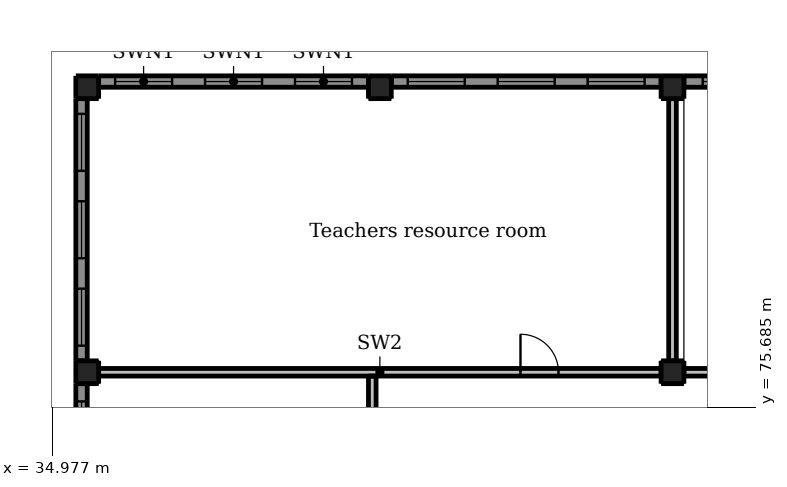
"""IFC4 building model, lengths in metres.
Left out: names, types, materials, properties, quantities, classifications, styles, units other than length and angle.
Written with IfcOpenShell. Run it as: python <this file> out.ifc"""

import sys

from ifc_helpers import new_model, si_unit, direction, frame, frame_2d, origin, origin_2d, place, context, subcontext, project, spatial, rectangle, extrude, element, fill, save


model = new_model("IFC4")
c1 = context("Model", 3, precision=1e-05, world=origin(), true_north=direction((0.0, 1.0)))
c2 = subcontext(c1, "Body", "Model", "MODEL_VIEW")
j1 = project(units=[si_unit("LENGTHUNIT", "METRE"), si_unit("PLANEANGLEUNIT", "RADIAN")], contexts=[c1])
p1 = place(None, origin())
s1 = spatial("IfcSite", under=j1, at=p1, CompositionType="ELEMENT")
p2 = place(p1, origin())
s2 = spatial("IfcBuilding", under=s1, at=p2, CompositionType="ELEMENT")
p3 = place(p2, frame((0.0, 0.0, 5.5)))
s3 = spatial("IfcBuildingStorey", under=s2, at=p3, CompositionType="ELEMENT", Elevation=5.5)
for number, where, z_axis, x_axis in (
    (1, (35.9, 76.6, -0.3), (0.0, 0.0, 1.0), (1.0, 0.0, 0.0)),
    (2, (51.3, 76.6, -0.3), (0.0, 0.0, 1.0), (1.0, 0.0, 0.0)),
    (3, (35.9, 84.1, -0.3), (0.0, 0.0, 1.0), (1.0, 0.0, 0.0)),
    (4, (51.3, 84.1, -0.3), (0.0, 0.0, 1.0), (1.0, 0.0, 0.0)),
    (5, (43.6, 84.1, -0.3), (0.0, 0.0, 1.0), (1.0, 0.0, 0.0)),
):
    element("IfcColumn", number, at=place(p3, frame(where, z_axis=z_axis, x_axis=x_axis)), inside=s3, PredefinedType="COLUMN", context=c2, shape_type="SweptSolid", body=[
        extrude(rectangle(XDim=0.6, YDim=0.6, at=origin_2d()), origin(), (0.0, 0.0, 1.0), 4.5),
    ])
p4 = place(p3, frame((35.75, 69.0, 0.0), z_axis=(0.0, 0.0, 1.0), x_axis=(0.0, 1.0, 0.0)))
e6 = element("IfcWall", 6, at=p4, inside=s3, PredefinedType="SOLIDWALL", context=c2, shape_type="SweptSolid", body=[
    extrude(rectangle(XDim=7.3, YDim=0.3, at=frame_2d((3.65, 0.0))), origin(), (0.0, 0.0, 1.0), 3.3),
])
p5 = place(p4, frame((0.467, 0.0, 0.9)))
e7 = element("IfcOpeningElement", 7, at=p5, cuts=e6, PredefinedType="OPENING", context=c2, shape_type="SweptSolid", body=[
    extrude(rectangle(XDim=1.5, YDim=1.5, at=frame_2d((0.75, 0.75))), frame((0.0, 0.16, 0.0), z_axis=(0.0, -1.0, 0.0), x_axis=(1.0, 0.0, 0.0)), (0.0, 0.0, 1.0), 0.32),
])
p6 = place(p4, frame((2.9, 0.0, 0.9)))
e8 = element("IfcOpeningElement", 8, at=p6, cuts=e6, PredefinedType="OPENING", context=c2, shape_type="SweptSolid", body=[
    extrude(rectangle(XDim=1.5, YDim=1.5, at=frame_2d((0.75, 0.75))), frame((0.0, 0.16, 0.0), z_axis=(0.0, -1.0, 0.0), x_axis=(1.0, 0.0, 0.0)), (0.0, 0.0, 1.0), 0.32),
])
p7 = place(p4, frame((5.333, 0.0, 0.9)))
e9 = element("IfcOpeningElement", 9, at=p7, cuts=e6, PredefinedType="OPENING", context=c2, shape_type="SweptSolid", body=[
    extrude(rectangle(XDim=1.5, YDim=1.5, at=frame_2d((0.75, 0.75))), frame((0.0, 0.16, 0.0), z_axis=(0.0, -1.0, 0.0), x_axis=(1.0, 0.0, 0.0)), (0.0, 0.0, 1.0), 0.32),
])
p8 = place(p3, frame((35.75, 76.9, 0.0), z_axis=(0.0, 0.0, 1.0), x_axis=(0.0, 1.0, 0.0)))
e10 = element("IfcWall", 10, at=p8, inside=s3, PredefinedType="SOLIDWALL", context=c2, shape_type="SweptSolid", body=[
    extrude(rectangle(XDim=6.9, YDim=0.3, at=frame_2d((3.45, 0.0))), origin(), (0.0, 0.0, 1.0), 3.3),
])
p9 = place(p8, frame((0.4, 0.0, 0.9)))
e11 = element("IfcOpeningElement", 11, at=p9, cuts=e10, PredefinedType="OPENING", context=c2, shape_type="SweptSolid", body=[
    extrude(rectangle(XDim=1.5, YDim=1.5, at=frame_2d((0.75, 0.75))), frame((0.0, 0.16, 0.0), z_axis=(0.0, -1.0, 0.0), x_axis=(1.0, 0.0, 0.0)), (0.0, 0.0, 1.0), 0.32),
])
p10 = place(p8, frame((2.7, 0.0, 0.9)))
e12 = element("IfcOpeningElement", 12, at=p10, cuts=e10, PredefinedType="OPENING", context=c2, shape_type="SweptSolid", body=[
    extrude(rectangle(XDim=1.5, YDim=1.5, at=frame_2d((0.75, 0.75))), frame((0.0, 0.16, 0.0), z_axis=(0.0, -1.0, 0.0), x_axis=(1.0, 0.0, 0.0)), (0.0, 0.0, 1.0), 0.32),
])
p11 = place(p8, frame((5.0, 0.0, 0.9)))
e13 = element("IfcOpeningElement", 13, at=p11, cuts=e10, PredefinedType="OPENING", context=c2, shape_type="SweptSolid", body=[
    extrude(rectangle(XDim=1.5, YDim=1.5, at=frame_2d((0.75, 0.75))), frame((0.0, 0.16, 0.0), z_axis=(0.0, -1.0, 0.0), x_axis=(1.0, 0.0, 0.0)), (0.0, 0.0, 1.0), 0.32),
])
p12 = place(p3, frame((36.2, 84.25, 0.0), z_axis=(0.0, 0.0, 1.0), x_axis=(1.0, 0.0, 0.0)))
e14 = element("IfcWall", 14, at=p12, inside=s3, PredefinedType="SOLIDWALL", context=c2, shape_type="SweptSolid", body=[
    extrude(rectangle(XDim=7.1, YDim=0.3, at=frame_2d((3.55, 0.0))), origin(), (0.0, 0.0, 1.0), 3.3),
])
p13 = place(p12, frame((0.433, 0.0, 0.9)))
e15 = element("IfcOpeningElement", 15, at=p13, cuts=e14, PredefinedType="OPENING", context=c2, shape_type="SweptSolid", body=[
    extrude(rectangle(XDim=1.5, YDim=1.5, at=frame_2d((0.75, 0.75))), frame((0.0, 0.16, 0.0), z_axis=(0.0, -1.0, 0.0), x_axis=(1.0, 0.0, 0.0)), (0.0, 0.0, 1.0), 0.32),
])
p14 = place(p12, frame((2.8, 0.0, 0.9)))
e16 = element("IfcOpeningElement", 16, at=p14, cuts=e14, PredefinedType="OPENING", context=c2, shape_type="SweptSolid", body=[
    extrude(rectangle(XDim=1.5, YDim=1.5, at=frame_2d((0.75, 0.75))), frame((0.0, 0.16, 0.0), z_axis=(0.0, -1.0, 0.0), x_axis=(1.0, 0.0, 0.0)), (0.0, 0.0, 1.0), 0.32),
])
p15 = place(p12, frame((5.167, 0.0, 0.9)))
e17 = element("IfcOpeningElement", 17, at=p15, cuts=e14, PredefinedType="OPENING", context=c2, shape_type="SweptSolid", body=[
    extrude(rectangle(XDim=1.5, YDim=1.5, at=frame_2d((0.75, 0.75))), frame((0.0, 0.16, 0.0), z_axis=(0.0, -1.0, 0.0), x_axis=(1.0, 0.0, 0.0)), (0.0, 0.0, 1.0), 0.32),
])
p16 = place(p3, frame((43.9, 84.25, 0.0), z_axis=(0.0, 0.0, 1.0), x_axis=(1.0, 0.0, 0.0)))
e18 = element("IfcWall", 18, at=p16, inside=s3, PredefinedType="SOLIDWALL", context=c2, shape_type="SweptSolid", body=[
    extrude(rectangle(XDim=7.1, YDim=0.3, at=frame_2d((3.55, 0.0))), origin(), (0.0, 0.0, 1.0), 3.3),
])
p17 = place(p16, frame((0.433, 0.0, 0.9)))
e19 = element("IfcOpeningElement", 19, at=p17, cuts=e18, PredefinedType="OPENING", context=c2, shape_type="SweptSolid", body=[
    extrude(rectangle(XDim=1.5, YDim=1.5, at=frame_2d((0.75, 0.75))), frame((0.0, 0.16, 0.0), z_axis=(0.0, -1.0, 0.0), x_axis=(1.0, 0.0, 0.0)), (0.0, 0.0, 1.0), 0.32),
])
p18 = place(p16, frame((2.8, 0.0, 0.9)))
e20 = element("IfcOpeningElement", 20, at=p18, cuts=e18, PredefinedType="OPENING", context=c2, shape_type="SweptSolid", body=[
    extrude(rectangle(XDim=1.5, YDim=1.5, at=frame_2d((0.75, 0.75))), frame((0.0, 0.16, 0.0), z_axis=(0.0, -1.0, 0.0), x_axis=(1.0, 0.0, 0.0)), (0.0, 0.0, 1.0), 0.32),
])
p19 = place(p16, frame((5.167, 0.0, 0.9)))
e21 = element("IfcOpeningElement", 21, at=p19, cuts=e18, PredefinedType="OPENING", context=c2, shape_type="SweptSolid", body=[
    extrude(rectangle(XDim=1.5, YDim=1.5, at=frame_2d((0.75, 0.75))), frame((0.0, 0.16, 0.0), z_axis=(0.0, -1.0, 0.0), x_axis=(1.0, 0.0, 0.0)), (0.0, 0.0, 1.0), 0.32),
])
p20 = place(p3, frame((51.6, 84.25, 0.0), z_axis=(0.0, 0.0, 1.0), x_axis=(1.0, 0.0, 0.0)))
e22 = element("IfcWall", 22, at=p20, inside=s3, PredefinedType="SOLIDWALL", context=c2, shape_type="SweptSolid", body=[
    extrude(rectangle(XDim=7.467, YDim=0.3, at=frame_2d((3.733, 0.0))), origin(), (0.0, 0.0, 1.0), 3.3),
])
p21 = place(p20, frame((0.494, 0.0, 0.9)))
e23 = element("IfcOpeningElement", 23, at=p21, cuts=e22, PredefinedType="OPENING", context=c2, shape_type="SweptSolid", body=[
    extrude(rectangle(XDim=1.5, YDim=1.5, at=frame_2d((0.75, 0.75))), frame((0.0, 0.16, 0.0), z_axis=(0.0, -1.0, 0.0), x_axis=(1.0, 0.0, 0.0)), (0.0, 0.0, 1.0), 0.32),
])
p22 = place(p20, frame((2.983, 0.0, 0.9)))
e24 = element("IfcOpeningElement", 24, at=p22, cuts=e22, PredefinedType="OPENING", context=c2, shape_type="SweptSolid", body=[
    extrude(rectangle(XDim=1.5, YDim=1.5, at=frame_2d((0.75, 0.75))), frame((0.0, 0.16, 0.0), z_axis=(0.0, -1.0, 0.0), x_axis=(1.0, 0.0, 0.0)), (0.0, 0.0, 1.0), 0.32),
])
p23 = place(p20, frame((5.472, 0.0, 0.9)))
e25 = element("IfcOpeningElement", 25, at=p23, cuts=e22, PredefinedType="OPENING", context=c2, shape_type="SweptSolid", body=[
    extrude(rectangle(XDim=1.5, YDim=1.5, at=frame_2d((0.75, 0.75))), frame((0.0, 0.16, 0.0), z_axis=(0.0, -1.0, 0.0), x_axis=(1.0, 0.0, 0.0)), (0.0, 0.0, 1.0), 0.32),
])
p24 = place(p3, frame((43.4, 68.8, 0.0), z_axis=(0.0, 0.0, 1.0), x_axis=(0.0, 1.0, 0.0)))
e26 = element("IfcWall", 26, at=p24, inside=s3, PredefinedType="PARTITIONING", context=c2, shape_type="SweptSolid", body=[
    extrude(rectangle(XDim=7.7, YDim=0.2, at=frame_2d((3.85, 0.0))), origin(), (0.0, 0.0, 1.0), 3.1),
])
p25 = place(p24, frame((3.35, 0.0, 0.0)))
e27 = element("IfcOpeningElement", 27, at=p25, cuts=e26, PredefinedType="OPENING", context=c2, shape_type="SweptSolid", body=[
    extrude(rectangle(XDim=1.0, YDim=2.1, at=frame_2d((0.5, 1.05))), frame((0.0, 0.11, 0.0), z_axis=(0.0, -1.0, 0.0), x_axis=(1.0, 0.0, 0.0)), (0.0, 0.0, 1.0), 0.22),
])
p26 = place(p3, frame((36.2, 76.6, 0.0), z_axis=(0.0, 0.0, 1.0), x_axis=(1.0, 0.0, 0.0)))
e28 = element("IfcWall", 28, at=p26, inside=s3, PredefinedType="PARTITIONING", context=c2, shape_type="SweptSolid", body=[
    extrude(rectangle(XDim=14.8, YDim=0.2, at=frame_2d((7.4, 0.0))), origin(), (0.0, 0.0, 1.0), 3.1),
])
p27 = place(p26, frame((11.1, 0.0, 0.0)))
e29 = element("IfcOpeningElement", 29, at=p27, cuts=e28, PredefinedType="OPENING", context=c2, shape_type="SweptSolid", body=[
    extrude(rectangle(XDim=1.0, YDim=2.1, at=frame_2d((0.5, 1.05))), frame((0.0, 0.11, 0.0), z_axis=(0.0, -1.0, 0.0), x_axis=(1.0, 0.0, 0.0)), (0.0, 0.0, 1.0), 0.22),
])
p28 = place(p3, frame((51.3, 76.9, 0.0), z_axis=(0.0, 0.0, 1.0), x_axis=(0.0, 1.0, 0.0)))
e30 = element("IfcWall", 30, at=p28, inside=s3, PredefinedType="PARTITIONING", context=c2, shape_type="SweptSolid", body=[
    extrude(rectangle(XDim=6.9, YDim=0.2, at=frame_2d((3.45, 0.0))), origin(), (0.0, 0.0, 1.0), 3.1),
])
p29 = place(p3, frame((51.6, 76.6, 0.0), z_axis=(0.0, 0.0, 1.0), x_axis=(1.0, 0.0, 0.0)))
e31 = element("IfcWall", 31, at=p29, inside=s3, PredefinedType="PARTITIONING", context=c2, shape_type="SweptSolid", body=[
    extrude(rectangle(XDim=7.667, YDim=0.2, at=frame_2d((3.833, 0.0))), origin(), (0.0, 0.0, 1.0), 3.1),
])
p30 = place(p29, frame((3.333, 0.0, 0.0)))
e32 = element("IfcOpeningElement", 32, at=p30, cuts=e31, PredefinedType="OPENING", context=c2, shape_type="SweptSolid", body=[
    extrude(rectangle(XDim=1.0, YDim=2.1, at=frame_2d((0.5, 1.05))), frame((0.0, 0.11, 0.0), z_axis=(0.0, -1.0, 0.0), x_axis=(1.0, 0.0, 0.0)), (0.0, 0.0, 1.0), 0.22),
])
p31 = place(p7, origin())
e33 = element("IfcWindow", 33, at=p31, inside=s3, PartitioningType="DOUBLE_PANEL_HORIZONTAL", PredefinedType="WINDOW", context=c2, shape_type="SweptSolid", body=[
    extrude(rectangle(XDim=1.5, YDim=1.5, at=frame_2d((0.75, 0.75))), frame((0.0, 0.03, 0.0), z_axis=(0.0, -1.0, 0.0), x_axis=(1.0, 0.0, 0.0)), (0.0, 0.0, 1.0), 0.06),
])
fill(e9, e33)
p32 = place(p9, origin())
e34 = element("IfcWindow", 34, at=p32, inside=s3, PartitioningType="DOUBLE_PANEL_HORIZONTAL", PredefinedType="WINDOW", context=c2, shape_type="SweptSolid", body=[
    extrude(rectangle(XDim=1.5, YDim=1.5, at=frame_2d((0.75, 0.75))), frame((0.0, 0.03, 0.0), z_axis=(0.0, -1.0, 0.0), x_axis=(1.0, 0.0, 0.0)), (0.0, 0.0, 1.0), 0.06),
])
fill(e11, e34)
p33 = place(p10, origin())
e35 = element("IfcWindow", 35, at=p33, inside=s3, PartitioningType="DOUBLE_PANEL_HORIZONTAL", PredefinedType="WINDOW", context=c2, shape_type="SweptSolid", body=[
    extrude(rectangle(XDim=1.5, YDim=1.5, at=frame_2d((0.75, 0.75))), frame((0.0, 0.03, 0.0), z_axis=(0.0, -1.0, 0.0), x_axis=(1.0, 0.0, 0.0)), (0.0, 0.0, 1.0), 0.06),
])
fill(e12, e35)
p34 = place(p11, origin())
e36 = element("IfcWindow", 36, at=p34, inside=s3, PartitioningType="DOUBLE_PANEL_HORIZONTAL", PredefinedType="WINDOW", context=c2, shape_type="SweptSolid", body=[
    extrude(rectangle(XDim=1.5, YDim=1.5, at=frame_2d((0.75, 0.75))), frame((0.0, 0.03, 0.0), z_axis=(0.0, -1.0, 0.0), x_axis=(1.0, 0.0, 0.0)), (0.0, 0.0, 1.0), 0.06),
])
fill(e13, e36)
p35 = place(p13, origin())
e37 = element("IfcWindow", 37, at=p35, inside=s3, PartitioningType="DOUBLE_PANEL_HORIZONTAL", PredefinedType="WINDOW", context=c2, shape_type="SweptSolid", body=[
    extrude(rectangle(XDim=1.5, YDim=1.5, at=frame_2d((0.75, 0.75))), frame((0.0, 0.03, 0.0), z_axis=(0.0, -1.0, 0.0), x_axis=(1.0, 0.0, 0.0)), (0.0, 0.0, 1.0), 0.06),
])
fill(e15, e37)
p36 = place(p14, origin())
e38 = element("IfcWindow", 38, at=p36, inside=s3, PartitioningType="DOUBLE_PANEL_HORIZONTAL", PredefinedType="WINDOW", context=c2, shape_type="SweptSolid", body=[
    extrude(rectangle(XDim=1.5, YDim=1.5, at=frame_2d((0.75, 0.75))), frame((0.0, 0.03, 0.0), z_axis=(0.0, -1.0, 0.0), x_axis=(1.0, 0.0, 0.0)), (0.0, 0.0, 1.0), 0.06),
])
fill(e16, e38)
p37 = place(p15, origin())
e39 = element("IfcWindow", 39, at=p37, inside=s3, PartitioningType="DOUBLE_PANEL_HORIZONTAL", PredefinedType="WINDOW", context=c2, shape_type="SweptSolid", body=[
    extrude(rectangle(XDim=1.5, YDim=1.5, at=frame_2d((0.75, 0.75))), frame((0.0, 0.03, 0.0), z_axis=(0.0, -1.0, 0.0), x_axis=(1.0, 0.0, 0.0)), (0.0, 0.0, 1.0), 0.06),
])
fill(e17, e39)
p38 = place(p17, origin())
e40 = element("IfcWindow", 40, at=p38, inside=s3, PartitioningType="DOUBLE_PANEL_HORIZONTAL", PredefinedType="WINDOW", context=c2, shape_type="SweptSolid", body=[
    extrude(rectangle(XDim=1.5, YDim=1.5, at=frame_2d((0.75, 0.75))), frame((0.0, 0.03, 0.0), z_axis=(0.0, -1.0, 0.0), x_axis=(1.0, 0.0, 0.0)), (0.0, 0.0, 1.0), 0.06),
])
fill(e19, e40)
p39 = place(p18, origin())
e41 = element("IfcWindow", 41, at=p39, inside=s3, PartitioningType="DOUBLE_PANEL_HORIZONTAL", PredefinedType="WINDOW", context=c2, shape_type="SweptSolid", body=[
    extrude(rectangle(XDim=1.5, YDim=1.5, at=frame_2d((0.75, 0.75))), frame((0.0, 0.03, 0.0), z_axis=(0.0, -1.0, 0.0), x_axis=(1.0, 0.0, 0.0)), (0.0, 0.0, 1.0), 0.06),
])
fill(e20, e41)
p40 = place(p19, origin())
e42 = element("IfcWindow", 42, at=p40, inside=s3, PartitioningType="DOUBLE_PANEL_HORIZONTAL", PredefinedType="WINDOW", context=c2, shape_type="SweptSolid", body=[
    extrude(rectangle(XDim=1.5, YDim=1.5, at=frame_2d((0.75, 0.75))), frame((0.0, 0.03, 0.0), z_axis=(0.0, -1.0, 0.0), x_axis=(1.0, 0.0, 0.0)), (0.0, 0.0, 1.0), 0.06),
])
fill(e21, e42)
p41 = place(p21, origin())
e43 = element("IfcWindow", 43, at=p41, inside=s3, PartitioningType="DOUBLE_PANEL_HORIZONTAL", PredefinedType="WINDOW", context=c2, shape_type="SweptSolid", body=[
    extrude(rectangle(XDim=1.5, YDim=1.5, at=frame_2d((0.75, 0.75))), frame((0.0, 0.03, 0.0), z_axis=(0.0, -1.0, 0.0), x_axis=(1.0, 0.0, 0.0)), (0.0, 0.0, 1.0), 0.06),
])
fill(e23, e43)
p42 = place(p27, origin())
e44 = element("IfcDoor", 44, at=p42, inside=s3, OperationType="SINGLE_SWING_LEFT", PredefinedType="DOOR", context=c2, shape_type="SweptSolid", body=[
    extrude(rectangle(XDim=1.0, YDim=2.1, at=frame_2d((0.5, 1.05))), frame((0.0, 0.025, 0.0), z_axis=(0.0, -1.0, 0.0), x_axis=(1.0, 0.0, 0.0)), (0.0, 0.0, 1.0), 0.05),
])
fill(e29, e44)
save(model, sys.argv[1])
